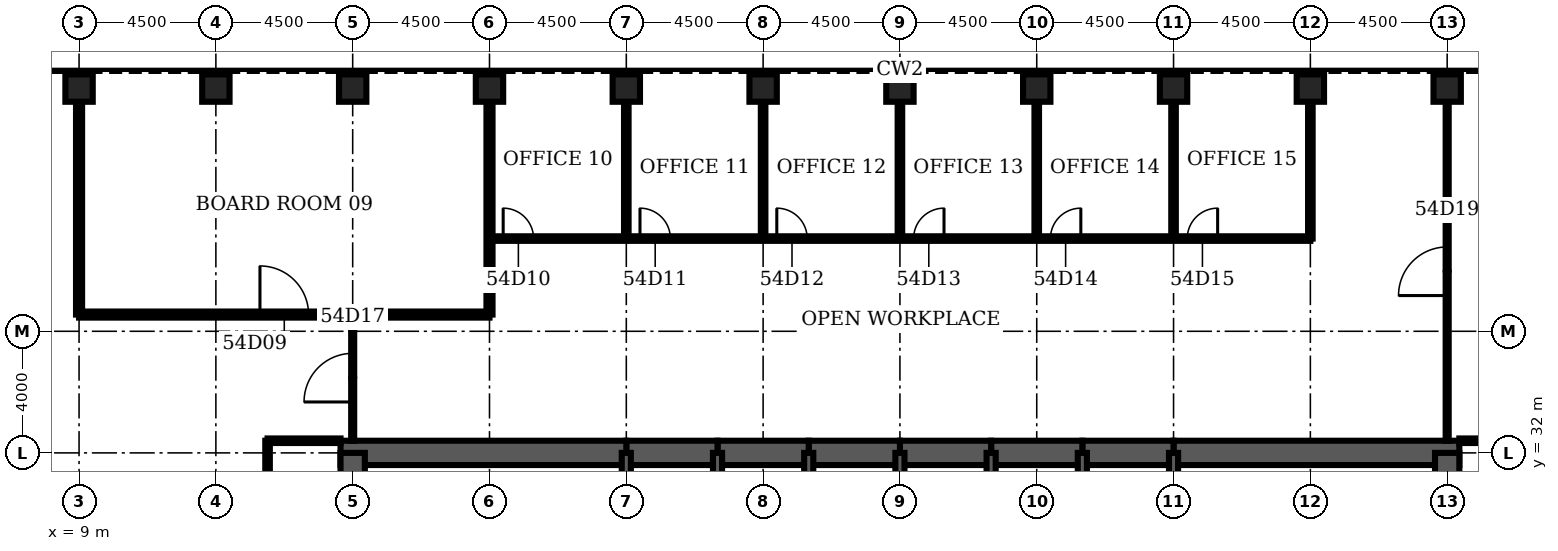
"""IFC4 building model, lengths in metres.
Left out: names, types, materials, properties, quantities, classifications, styles, units other than length and angle.
Written with IfcOpenShell. Run it as: python <this file> out.ifc"""

import sys

from ifc_helpers import new_model, si_unit, direction, frame, frame_2d, origin, origin_2d, place, context, subcontext, project, spatial, rectangle, hollow_rectangle, extrude, element, fill, save


model = new_model("IFC4")
c1 = context("Model", 3, precision=1e-05, world=origin(), true_north=direction((0.0, 1.0)))
c2 = subcontext(c1, "Body", "Model", "MODEL_VIEW")
j1 = project(units=[si_unit("LENGTHUNIT", "METRE"), si_unit("PLANEANGLEUNIT", "RADIAN")], contexts=[c1])
p1 = place(None, origin())
s1 = spatial("IfcSite", under=j1, at=p1, CompositionType="ELEMENT")
p2 = place(p1, origin())
s2 = spatial("IfcBuilding", under=s1, at=p2, CompositionType="ELEMENT")
p3 = place(p2, frame((0.0, 0.0, 240.4)))
s3 = spatial("IfcBuildingStorey", under=s2, at=p3, CompositionType="ELEMENT", Elevation=240.4)
for number, where, z_axis, x_axis in (
    (1, (54.0, 44.0, 0.0), (0.0, 0.0, 1.0), (0.0, 1.0, 0.0)),
    (2, (49.5, 44.0, 0.0), (0.0, 0.0, 1.0), (0.0, 1.0, 0.0)),
    (3, (45.0, 44.0, 0.0), (0.0, 0.0, 1.0), (0.0, 1.0, 0.0)),
    (4, (40.5, 44.0, 0.0), (0.0, 0.0, 1.0), (0.0, 1.0, 0.0)),
    (5, (36.0, 44.0, 0.0), (0.0, 0.0, 1.0), (0.0, 1.0, 0.0)),
    (6, (31.5, 44.0, 0.0), (0.0, 0.0, 1.0), (0.0, 1.0, 0.0)),
    (7, (27.0, 44.0, 0.0), (0.0, 0.0, 1.0), (0.0, 1.0, 0.0)),
    (8, (22.5, 44.0, 0.0), (0.0, 0.0, 1.0), (0.0, 1.0, 0.0)),
    (9, (18.0, 44.0, 0.0), (0.0, 0.0, 1.0), (0.0, 1.0, 0.0)),
    (10, (13.5, 44.0, 0.0), (0.0, 0.0, 1.0), (0.0, 1.0, 0.0)),
    (11, (9.0, 44.0, 0.0), (0.0, 0.0, 1.0), (0.0, 1.0, 0.0)),
):
    element("IfcColumn", number, at=place(p3, frame(where, z_axis=z_axis, x_axis=x_axis)), inside=s3, PredefinedType="COLUMN", context=c2, shape_type="SweptSolid", body=[
        extrude(hollow_rectangle(XDim=0.9, YDim=0.9, WallThickness=0.08, at=origin_2d()), origin(), (0.0, 0.0, 1.0), 4.2),
    ])
p4 = place(p3, frame((54.4, 32.0, 0.0), z_axis=(0.0, 0.0, 1.0), x_axis=(-1.0, 0.0, 0.0)))
e12 = element("IfcWall", 12, at=p4, inside=s3, PredefinedType="SHEAR", context=c2, shape_type="SweptSolid", body=[
    extrude(rectangle(XDim=9.4, YDim=0.8, at=frame_2d((4.7, 0.0))), origin(), (0.0, 0.0, 1.0), 4.2),
])
for number, where, z_axis, x_axis in (
    (13, (45.0, 32.0, 0.0), (0.0, 0.0, 1.0), (-1.0, 0.0, 0.0)),
    (14, (42.0, 32.0, 0.0), (0.0, 0.0, 1.0), (-1.0, 0.0, 0.0)),
    (15, (39.0, 32.0, 0.0), (0.0, 0.0, 1.0), (-1.0, 0.0, 0.0)),
    (16, (36.0, 32.0, 0.0), (0.0, 0.0, 1.0), (-1.0, 0.0, 0.0)),
    (17, (33.0, 32.0, 0.0), (0.0, 0.0, 1.0), (-1.0, 0.0, 0.0)),
    (18, (30.0, 32.0, 0.0), (0.0, 0.0, 1.0), (-1.0, 0.0, 0.0)),
):
    element("IfcWall", number, at=place(p3, frame(where, z_axis=z_axis, x_axis=x_axis)), inside=s3, PredefinedType="SHEAR", context=c2, shape_type="SweptSolid", body=[
        extrude(rectangle(XDim=3.0, YDim=0.8, at=frame_2d((1.5, 0.0))), origin(), (0.0, 0.0, 1.0), 4.2),
    ])
p5 = place(p3, frame((27.0, 32.0, 0.0), z_axis=(0.0, 0.0, 1.0), x_axis=(-1.0, 0.0, 0.0)))
e19 = element("IfcWall", 19, at=p5, inside=s3, PredefinedType="SHEAR", context=c2, shape_type="SweptSolid", body=[
    extrude(rectangle(XDim=9.4, YDim=0.8, at=frame_2d((4.7, 0.0))), origin(), (0.0, 0.0, 1.0), 4.2),
])
for number, where, z_axis, x_axis in (
    (20, (18.0, 32.0, 0.0), (0.0, 0.0, 1.0), (0.0, -1.0, 0.0)),
    (21, (54.0, 28.8, 0.0), (0.0, 0.0, 1.0), (0.0, 1.0, 0.0)),
):
    element("IfcWall", number, at=place(p3, frame(where, z_axis=z_axis, x_axis=x_axis)), inside=s3, PredefinedType="SHEAR", context=c2, shape_type="SweptSolid", body=[
        extrude(rectangle(XDim=3.2, YDim=0.8, at=frame_2d((1.6, 0.0))), origin(), (0.0, 0.0, 1.0), 4.2),
    ])
for number, where, z_axis, x_axis in (
    (22, (27.0, 28.8, 0.0), (0.0, 0.0, 1.0), (0.0, 1.0, 0.0)),
    (23, (30.0, 28.8, 0.0), (0.0, 0.0, 1.0), (0.0, 1.0, 0.0)),
    (24, (33.0, 28.8, 0.0), (0.0, 0.0, 1.0), (0.0, 1.0, 0.0)),
    (25, (36.0, 28.8, 0.0), (0.0, 0.0, 1.0), (0.0, 1.0, 0.0)),
    (26, (39.0, 28.8, 0.0), (0.0, 0.0, 1.0), (0.0, 1.0, 0.0)),
    (27, (42.0, 28.8, 0.0), (0.0, 0.0, 1.0), (0.0, 1.0, 0.0)),
    (28, (45.0, 28.8, 0.0), (0.0, 0.0, 1.0), (0.0, 1.0, 0.0)),
):
    element("IfcWall", number, at=place(p3, frame(where, z_axis=z_axis, x_axis=x_axis)), inside=s3, PredefinedType="SOLIDWALL", context=c2, shape_type="SweptSolid", body=[
        extrude(rectangle(XDim=3.2, YDim=0.3, at=frame_2d((1.6, 0.0))), origin(), (0.0, 0.0, 1.0), 4.2),
    ])
for number, where, z_axis, x_axis in (
    (29, (15.2, 32.4, 0.0), (0.0, 0.0, 1.0), (1.0, 0.0, 0.0)),
    (30, (54.4, 32.4, 0.0), (0.0, 0.0, 1.0), (1.0, 0.0, 0.0)),
):
    element("IfcWall", number, at=place(p3, frame(where, z_axis=z_axis, x_axis=x_axis)), inside=s3, PredefinedType="PARTITIONING", context=c2, shape_type="SweptSolid", body=[
        extrude(rectangle(XDim=2.4, YDim=0.15, at=frame_2d((1.2, 0.0))), origin(), (0.0, 0.0, 1.0), 3.0),
    ])
p6 = place(p3, frame((9.0, 36.55, 0.0), z_axis=(0.0, 0.0, 1.0), x_axis=(1.0, 0.0, 0.0)))
e31 = element("IfcWall", 31, at=p6, inside=s3, PredefinedType="PARTITIONING", context=c2, shape_type="SweptSolid", body=[
    extrude(rectangle(XDim=13.5, YDim=0.2, at=frame_2d((6.75, 0.0))), origin(), (0.0, 0.0, 1.0), 3.0),
])
p7 = place(p6, frame((5.95, 0.0, 0.0)))
e32 = element("IfcOpeningElement", 32, at=p7, cuts=e31, PredefinedType="OPENING", context=c2, shape_type="SweptSolid", body=[
    extrude(rectangle(XDim=1.6, YDim=2.1, at=frame_2d((0.8, 1.05))), frame((0.0, 0.11, 0.0), z_axis=(0.0, -1.0, 0.0), x_axis=(1.0, 0.0, 0.0)), (0.0, 0.0, 1.0), 0.22),
])
p8 = place(p3, frame((22.5, 39.05, 0.0), z_axis=(0.0, 0.0, 1.0), x_axis=(1.0, 0.0, 0.0)))
e33 = element("IfcWall", 33, at=p8, inside=s3, PredefinedType="PARTITIONING", context=c2, shape_type="SweptSolid", body=[
    extrude(rectangle(XDim=27.0, YDim=0.15, at=frame_2d((13.5, 0.0))), origin(), (0.0, 0.0, 1.0), 3.0),
])
p9 = place(p8, frame((0.45, 0.0, 0.0)))
e34 = element("IfcOpeningElement", 34, at=p9, cuts=e33, PredefinedType="OPENING", context=c2, shape_type="SweptSolid", body=[
    extrude(rectangle(XDim=1.0, YDim=2.1, at=frame_2d((0.5, 1.05))), frame((0.0, 0.085, 0.0), z_axis=(0.0, -1.0, 0.0), x_axis=(1.0, 0.0, 0.0)), (0.0, 0.0, 1.0), 0.17),
])
p10 = place(p8, frame((4.95, 0.0, 0.0)))
e35 = element("IfcOpeningElement", 35, at=p10, cuts=e33, PredefinedType="OPENING", context=c2, shape_type="SweptSolid", body=[
    extrude(rectangle(XDim=1.0, YDim=2.1, at=frame_2d((0.5, 1.05))), frame((0.0, 0.085, 0.0), z_axis=(0.0, -1.0, 0.0), x_axis=(1.0, 0.0, 0.0)), (0.0, 0.0, 1.0), 0.17),
])
p11 = place(p8, frame((9.45, 0.0, 0.0)))
e36 = element("IfcOpeningElement", 36, at=p11, cuts=e33, PredefinedType="OPENING", context=c2, shape_type="SweptSolid", body=[
    extrude(rectangle(XDim=1.0, YDim=2.1, at=frame_2d((0.5, 1.05))), frame((0.0, 0.085, 0.0), z_axis=(0.0, -1.0, 0.0), x_axis=(1.0, 0.0, 0.0)), (0.0, 0.0, 1.0), 0.17),
])
p12 = place(p8, frame((13.95, 0.0, 0.0)))
e37 = element("IfcOpeningElement", 37, at=p12, cuts=e33, PredefinedType="OPENING", context=c2, shape_type="SweptSolid", body=[
    extrude(rectangle(XDim=1.0, YDim=2.1, at=frame_2d((0.5, 1.05))), frame((0.0, 0.085, 0.0), z_axis=(0.0, -1.0, 0.0), x_axis=(1.0, 0.0, 0.0)), (0.0, 0.0, 1.0), 0.17),
])
p13 = place(p8, frame((18.45, 0.0, 0.0)))
e38 = element("IfcOpeningElement", 38, at=p13, cuts=e33, PredefinedType="OPENING", context=c2, shape_type="SweptSolid", body=[
    extrude(rectangle(XDim=1.0, YDim=2.1, at=frame_2d((0.5, 1.05))), frame((0.0, 0.085, 0.0), z_axis=(0.0, -1.0, 0.0), x_axis=(1.0, 0.0, 0.0)), (0.0, 0.0, 1.0), 0.17),
])
p14 = place(p8, frame((22.95, 0.0, 0.0)))
e39 = element("IfcOpeningElement", 39, at=p14, cuts=e33, PredefinedType="OPENING", context=c2, shape_type="SweptSolid", body=[
    extrude(rectangle(XDim=1.0, YDim=2.1, at=frame_2d((0.5, 1.05))), frame((0.0, 0.085, 0.0), z_axis=(0.0, -1.0, 0.0), x_axis=(1.0, 0.0, 0.0)), (0.0, 0.0, 1.0), 0.17),
])
p15 = place(p3, frame((9.0, 36.55, 0.0), z_axis=(0.0, 0.0, 1.0), x_axis=(0.0, 1.0, 0.0)))
e40 = element("IfcWall", 40, at=p15, inside=s3, PredefinedType="PARTITIONING", context=c2, shape_type="SweptSolid", body=[
    extrude(rectangle(XDim=7.0, YDim=0.2, at=frame_2d((3.5, 0.0))), origin(), (0.0, 0.0, 1.0), 3.0),
])
p16 = place(p3, frame((15.2, 13.8, 0.0), z_axis=(0.0, 0.0, 1.0), x_axis=(0.0, 1.0, 0.0)))
e41 = element("IfcWall", 41, at=p16, inside=s3, PredefinedType="PARTITIONING", context=c2, shape_type="SweptSolid", body=[
    extrude(rectangle(XDim=18.6, YDim=0.15, at=frame_2d((9.3, 0.0))), origin(), (0.0, 0.0, 1.0), 3.0),
])
p17 = place(p16, frame((8.7, 0.0, 0.0)))
e42 = element("IfcOpeningElement", 42, at=p17, cuts=e41, PredefinedType="OPENING", context=c2, shape_type="SweptSolid", body=[
    extrude(rectangle(XDim=1.2, YDim=2.1, at=frame_2d((0.6, 1.05))), frame((0.0, 0.085, 0.0), z_axis=(0.0, -1.0, 0.0), x_axis=(1.0, 0.0, 0.0)), (0.0, 0.0, 1.0), 0.17),
])
p18 = place(p3, frame((18.0, 32.4, 0.0), z_axis=(0.0, 0.0, 1.0), x_axis=(0.0, 1.0, 0.0)))
e43 = element("IfcWall", 43, at=p18, inside=s3, PredefinedType="PARTITIONING", context=c2, shape_type="SweptSolid", body=[
    extrude(rectangle(XDim=4.15, YDim=0.1, at=frame_2d((2.075, 0.0))), origin(), (0.0, 0.0, 1.0), 3.0),
])
p19 = place(p18, frame((1.275, 0.0, 0.0)))
e44 = element("IfcOpeningElement", 44, at=p19, cuts=e43, PredefinedType="OPENING", context=c2, shape_type="SweptSolid", body=[
    extrude(rectangle(XDim=1.6, YDim=2.1, at=frame_2d((0.8, 1.05))), frame((0.0, 0.06, 0.0), z_axis=(0.0, -1.0, 0.0), x_axis=(1.0, 0.0, 0.0)), (0.0, 0.0, 1.0), 0.12),
])
p20 = place(p3, frame((22.5, 36.55, 0.0), z_axis=(0.0, 0.0, 1.0), x_axis=(0.0, 1.0, 0.0)))
e45 = element("IfcWall", 45, at=p20, inside=s3, PredefinedType="PARTITIONING", context=c2, shape_type="SweptSolid", body=[
    extrude(rectangle(XDim=7.0, YDim=0.2, at=frame_2d((3.5, 0.0))), origin(), (0.0, 0.0, 1.0), 3.0),
])
for number, where, z_axis, x_axis in (
    (46, (27.0, 39.05, 0.0), (0.0, 0.0, 1.0), (0.0, 1.0, 0.0)),
    (47, (31.5, 39.05, 0.0), (0.0, 0.0, 1.0), (0.0, 1.0, 0.0)),
    (48, (36.0, 39.05, 0.0), (0.0, 0.0, 1.0), (0.0, 1.0, 0.0)),
    (49, (40.5, 39.05, 0.0), (0.0, 0.0, 1.0), (0.0, 1.0, 0.0)),
    (50, (45.0, 39.05, 0.0), (0.0, 0.0, 1.0), (0.0, 1.0, 0.0)),
    (51, (49.5, 39.05, 0.0), (0.0, 0.0, 1.0), (0.0, 1.0, 0.0)),
):
    element("IfcWall", number, at=place(p3, frame(where, z_axis=z_axis, x_axis=x_axis)), inside=s3, PredefinedType="PARTITIONING", context=c2, shape_type="SweptSolid", body=[
        extrude(rectangle(XDim=4.5, YDim=0.15, at=frame_2d((2.25, 0.0))), origin(), (0.0, 0.0, 1.0), 3.0),
    ])
p21 = place(p3, frame((54.0, 32.4, 0.0), z_axis=(0.0, 0.0, 1.0), x_axis=(0.0, 1.0, 0.0)))
e52 = element("IfcWall", 52, at=p21, inside=s3, PredefinedType="PARTITIONING", context=c2, shape_type="SweptSolid", body=[
    extrude(rectangle(XDim=11.15, YDim=0.1, at=frame_2d((5.575, 0.0))), origin(), (0.0, 0.0, 1.0), 3.0),
])
p22 = place(p21, frame((4.775, 0.0, 0.0)))
e53 = element("IfcOpeningElement", 53, at=p22, cuts=e52, PredefinedType="OPENING", context=c2, shape_type="SweptSolid", body=[
    extrude(rectangle(XDim=1.6, YDim=2.1, at=frame_2d((0.8, 1.05))), frame((0.0, 0.06, 0.0), z_axis=(0.0, -1.0, 0.0), x_axis=(1.0, 0.0, 0.0)), (0.0, 0.0, 1.0), 0.12),
])
p23 = place(p7, origin())
e54 = element("IfcDoor", 54, at=p23, inside=s3, OperationType="SINGLE_SWING_LEFT", PredefinedType="DOOR", context=c2, shape_type="SweptSolid", body=[
    extrude(rectangle(XDim=1.6, YDim=2.1, at=frame_2d((0.8, 1.05))), frame((0.0, 0.025, 0.0), z_axis=(0.0, -1.0, 0.0), x_axis=(1.0, 0.0, 0.0)), (0.0, 0.0, 1.0), 0.05),
])
fill(e32, e54)
p24 = place(p9, origin())
e55 = element("IfcDoor", 55, at=p24, inside=s3, OperationType="SINGLE_SWING_LEFT", PredefinedType="DOOR", context=c2, shape_type="SweptSolid", body=[
    extrude(rectangle(XDim=1.0, YDim=2.1, at=frame_2d((0.5, 1.05))), frame((0.0, 0.025, 0.0), z_axis=(0.0, -1.0, 0.0), x_axis=(1.0, 0.0, 0.0)), (0.0, 0.0, 1.0), 0.05),
])
fill(e34, e55)
p25 = place(p10, origin())
e56 = element("IfcDoor", 56, at=p25, inside=s3, OperationType="SINGLE_SWING_LEFT", PredefinedType="DOOR", context=c2, shape_type="SweptSolid", body=[
    extrude(rectangle(XDim=1.0, YDim=2.1, at=frame_2d((0.5, 1.05))), frame((0.0, 0.025, 0.0), z_axis=(0.0, -1.0, 0.0), x_axis=(1.0, 0.0, 0.0)), (0.0, 0.0, 1.0), 0.05),
])
fill(e35, e56)
p26 = place(p11, origin())
e57 = element("IfcDoor", 57, at=p26, inside=s3, OperationType="SINGLE_SWING_LEFT", PredefinedType="DOOR", context=c2, shape_type="SweptSolid", body=[
    extrude(rectangle(XDim=1.0, YDim=2.1, at=frame_2d((0.5, 1.05))), frame((0.0, 0.025, 0.0), z_axis=(0.0, -1.0, 0.0), x_axis=(1.0, 0.0, 0.0)), (0.0, 0.0, 1.0), 0.05),
])
fill(e36, e57)
p27 = place(p12, origin())
e58 = element("IfcDoor", 58, at=p27, inside=s3, OperationType="SINGLE_SWING_RIGHT", PredefinedType="DOOR", context=c2, shape_type="SweptSolid", body=[
    extrude(rectangle(XDim=1.0, YDim=2.1, at=frame_2d((0.5, 1.05))), frame((0.0, 0.025, 0.0), z_axis=(0.0, -1.0, 0.0), x_axis=(1.0, 0.0, 0.0)), (0.0, 0.0, 1.0), 0.05),
])
fill(e37, e58)
p28 = place(p13, origin())
e59 = element("IfcDoor", 59, at=p28, inside=s3, OperationType="SINGLE_SWING_RIGHT", PredefinedType="DOOR", context=c2, shape_type="SweptSolid", body=[
    extrude(rectangle(XDim=1.0, YDim=2.1, at=frame_2d((0.5, 1.05))), frame((0.0, 0.025, 0.0), z_axis=(0.0, -1.0, 0.0), x_axis=(1.0, 0.0, 0.0)), (0.0, 0.0, 1.0), 0.05),
])
fill(e38, e59)
p29 = place(p14, origin())
e60 = element("IfcDoor", 60, at=p29, inside=s3, OperationType="SINGLE_SWING_RIGHT", PredefinedType="DOOR", context=c2, shape_type="SweptSolid", body=[
    extrude(rectangle(XDim=1.0, YDim=2.1, at=frame_2d((0.5, 1.05))), frame((0.0, 0.025, 0.0), z_axis=(0.0, -1.0, 0.0), x_axis=(1.0, 0.0, 0.0)), (0.0, 0.0, 1.0), 0.05),
])
fill(e39, e60)
p30 = place(p19, origin())
e61 = element("IfcDoor", 61, at=p30, inside=s3, OperationType="SINGLE_SWING_LEFT", PredefinedType="DOOR", context=c2, shape_type="SweptSolid", body=[
    extrude(rectangle(XDim=1.6, YDim=2.1, at=frame_2d((0.8, 1.05))), frame((0.0, 0.025, 0.0), z_axis=(0.0, -1.0, 0.0), x_axis=(1.0, 0.0, 0.0)), (0.0, 0.0, 1.0), 0.05),
])
fill(e44, e61)
p31 = place(p22, origin())
e62 = element("IfcDoor", 62, at=p31, inside=s3, OperationType="SINGLE_SWING_LEFT", PredefinedType="DOOR", context=c2, shape_type="SweptSolid", body=[
    extrude(rectangle(XDim=1.6, YDim=2.1, at=frame_2d((0.8, 1.05))), frame((0.0, 0.025, 0.0), z_axis=(0.0, -1.0, 0.0), x_axis=(1.0, 0.0, 0.0)), (0.0, 0.0, 1.0), 0.05),
])
fill(e53, e62)
save(model, sys.argv[1])
